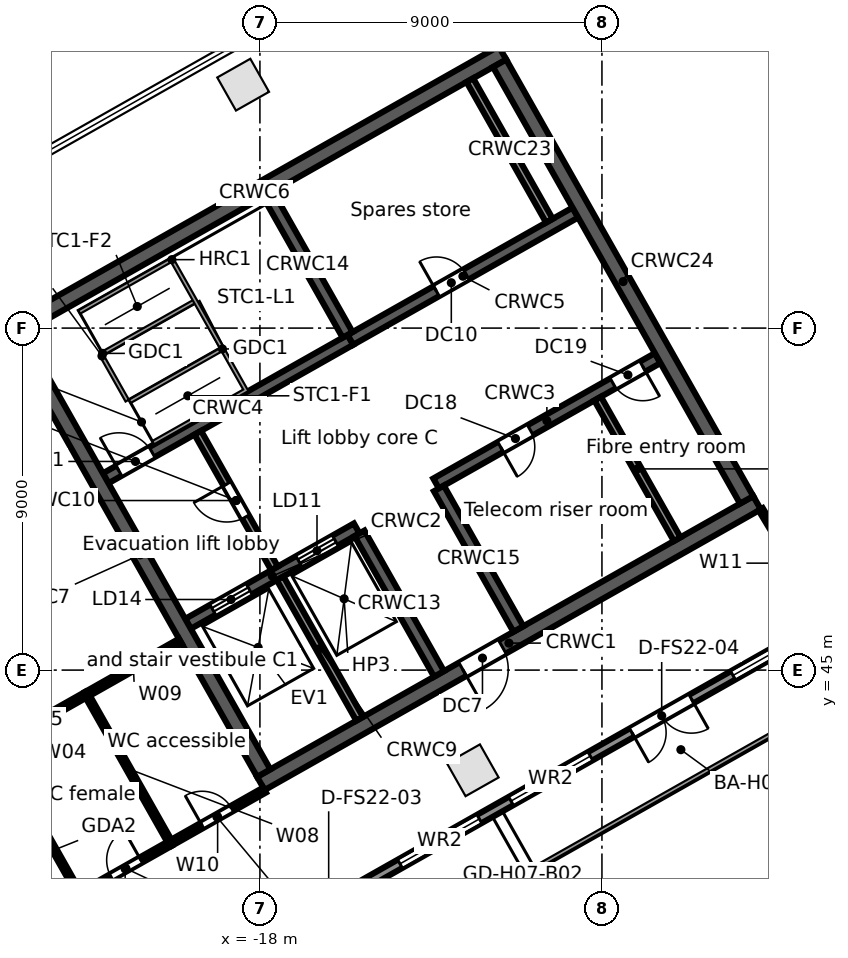
"""IFC4 building model, lengths in metres.
Left out: names, types, materials, properties, quantities, classifications, styles, units other than length and angle.
Written with IfcOpenShell. Run it as: python <this file> out.ifc"""

import sys

from ifc_helpers import new_model, si_unit, direction, frame, frame_2d, origin, origin_2d, place, context, subcontext, project, spatial, rectangle, extrude, element, fill, save


model = new_model("IFC4")
c1 = context("Model", 3, precision=1e-05, world=origin(), true_north=direction((0.0, 1.0)))
c2 = subcontext(c1, "Body", "Model", "MODEL_VIEW")
j1 = project(units=[si_unit("LENGTHUNIT", "METRE"), si_unit("PLANEANGLEUNIT", "RADIAN")], contexts=[c1])
p1 = place(None, origin())
s1 = spatial("IfcSite", under=j1, at=p1, CompositionType="ELEMENT")
p2 = place(p1, origin())
s2 = spatial("IfcBuilding", under=s1, at=p2, CompositionType="ELEMENT")
p3 = place(p2, frame((0.0, 0.0, 327.9)))
s3 = spatial("IfcBuildingStorey", under=s2, at=p3, CompositionType="ELEMENT", Elevation=327.9)
for number, where, z_axis, x_axis in (
    (1, (-18.441, 60.406, 0.0), (0.0, 0.0, 1.0), (-0.87, -0.492, 0.0)),
    (2, (-12.4, 42.363, 0.0), (0.0, 0.0, 1.0), (0.87, 0.492, 0.0)),
):
    element("IfcColumn", number, at=place(p3, frame(where, z_axis=z_axis, x_axis=x_axis)), inside=s3, PredefinedType="COLUMN", context=c2, shape_type="SweptSolid", body=[
        extrude(rectangle(XDim=1.0, YDim=1.0, at=origin_2d()), origin(), (0.0, 0.0, 1.0), 3.8),
    ])
p4 = place(p3, frame((-3.017, 46.293, 0.0), z_axis=(0.0, 0.0, 1.0), x_axis=(-0.870355474887, -0.492423950812, 0.0)))
e3 = element("IfcWall", 3, at=p4, inside=s3, PredefinedType="STANDARD", context=c2, shape_type="SweptSolid", body=[
    extrude(rectangle(XDim=40.34, YDim=0.25, at=frame_2d((20.17, 0.0))), origin(), (0.0, 0.0, 1.0), 3.52),
])
p5 = place(p4, frame((37.428, 0.0, 0.8)))
e4 = element("IfcOpeningElement", 4, at=p5, cuts=e3, PredefinedType="OPENING", context=c2, shape_type="SweptSolid", body=[
    extrude(rectangle(XDim=2.4, YDim=2.2, at=frame_2d((1.2, 1.1))), frame((0.0, 0.135, 0.0), z_axis=(0.0, -1.0, 0.0), x_axis=(1.0, 0.0, 0.0)), (0.0, 0.0, 1.0), 0.27),
])
p6 = place(p4, frame((34.372, 0.0, 0.0)))
e5 = element("IfcOpeningElement", 5, at=p6, cuts=e3, PredefinedType="OPENING", context=c2, shape_type="SweptSolid", body=[
    extrude(rectangle(XDim=1.8, YDim=2.4, at=frame_2d((0.9, 1.2))), frame((0.0, 0.135, 0.0), z_axis=(0.0, -1.0, 0.0), x_axis=(1.0, 0.0, 0.0)), (0.0, 0.0, 1.0), 0.27),
])
p7 = place(p4, frame((30.716, 0.0, 0.8)))
e6 = element("IfcOpeningElement", 6, at=p7, cuts=e3, PredefinedType="OPENING", context=c2, shape_type="SweptSolid", body=[
    extrude(rectangle(XDim=2.4, YDim=2.2, at=frame_2d((1.2, 1.1))), frame((0.0, 0.135, 0.0), z_axis=(0.0, -1.0, 0.0), x_axis=(1.0, 0.0, 0.0)), (0.0, 0.0, 1.0), 0.27),
])
p8 = place(p4, frame((27.36, 0.0, 0.8)))
e7 = element("IfcOpeningElement", 7, at=p8, cuts=e3, PredefinedType="OPENING", context=c2, shape_type="SweptSolid", body=[
    extrude(rectangle(XDim=2.4, YDim=2.2, at=frame_2d((1.2, 1.1))), frame((0.0, 0.135, 0.0), z_axis=(0.0, -1.0, 0.0), x_axis=(1.0, 0.0, 0.0)), (0.0, 0.0, 1.0), 0.27),
])
p9 = place(p4, frame((24.304, 0.0, 0.0)))
e8 = element("IfcOpeningElement", 8, at=p9, cuts=e3, PredefinedType="OPENING", context=c2, shape_type="SweptSolid", body=[
    extrude(rectangle(XDim=1.8, YDim=2.4, at=frame_2d((0.9, 1.2))), frame((0.0, 0.135, 0.0), z_axis=(0.0, -1.0, 0.0), x_axis=(1.0, 0.0, 0.0)), (0.0, 0.0, 1.0), 0.27),
])
p10 = place(p4, frame((20.648, 0.0, 0.8)))
e9 = element("IfcOpeningElement", 9, at=p10, cuts=e3, PredefinedType="OPENING", context=c2, shape_type="SweptSolid", body=[
    extrude(rectangle(XDim=2.4, YDim=2.2, at=frame_2d((1.2, 1.1))), frame((0.0, 0.135, 0.0), z_axis=(0.0, -1.0, 0.0), x_axis=(1.0, 0.0, 0.0)), (0.0, 0.0, 1.0), 0.27),
])
p11 = place(p4, frame((17.292, 0.0, 0.8)))
e10 = element("IfcOpeningElement", 10, at=p11, cuts=e3, PredefinedType="OPENING", context=c2, shape_type="SweptSolid", body=[
    extrude(rectangle(XDim=2.4, YDim=2.2, at=frame_2d((1.2, 1.1))), frame((0.0, 0.135, 0.0), z_axis=(0.0, -1.0, 0.0), x_axis=(1.0, 0.0, 0.0)), (0.0, 0.0, 1.0), 0.27),
])
p12 = place(p4, frame((14.236, 0.0, 0.0)))
e11 = element("IfcOpeningElement", 11, at=p12, cuts=e3, PredefinedType="OPENING", context=c2, shape_type="SweptSolid", body=[
    extrude(rectangle(XDim=1.8, YDim=2.4, at=frame_2d((0.9, 1.2))), frame((0.0, 0.135, 0.0), z_axis=(0.0, -1.0, 0.0), x_axis=(1.0, 0.0, 0.0)), (0.0, 0.0, 1.0), 0.27),
])
p13 = place(p4, frame((10.58, 0.0, 0.8)))
e12 = element("IfcOpeningElement", 12, at=p13, cuts=e3, PredefinedType="OPENING", context=c2, shape_type="SweptSolid", body=[
    extrude(rectangle(XDim=2.4, YDim=2.2, at=frame_2d((1.2, 1.1))), frame((0.0, 0.135, 0.0), z_axis=(0.0, -1.0, 0.0), x_axis=(1.0, 0.0, 0.0)), (0.0, 0.0, 1.0), 0.27),
])
p14 = place(p4, frame((7.224, 0.0, 0.8)))
e13 = element("IfcOpeningElement", 13, at=p14, cuts=e3, PredefinedType="OPENING", context=c2, shape_type="SweptSolid", body=[
    extrude(rectangle(XDim=2.4, YDim=2.2, at=frame_2d((1.2, 1.1))), frame((0.0, 0.135, 0.0), z_axis=(0.0, -1.0, 0.0), x_axis=(1.0, 0.0, 0.0)), (0.0, 0.0, 1.0), 0.27),
])
p15 = place(p4, frame((4.168, 0.0, 0.0)))
e14 = element("IfcOpeningElement", 14, at=p15, cuts=e3, PredefinedType="OPENING", context=c2, shape_type="SweptSolid", body=[
    extrude(rectangle(XDim=1.8, YDim=2.4, at=frame_2d((0.9, 1.2))), frame((0.0, 0.135, 0.0), z_axis=(0.0, -1.0, 0.0), x_axis=(1.0, 0.0, 0.0)), (0.0, 0.0, 1.0), 0.27),
])
p16 = place(p4, frame((0.512, 0.0, 0.8)))
e15 = element("IfcOpeningElement", 15, at=p16, cuts=e3, PredefinedType="OPENING", context=c2, shape_type="SweptSolid", body=[
    extrude(rectangle(XDim=2.4, YDim=2.2, at=frame_2d((1.2, 1.1))), frame((0.0, 0.135, 0.0), z_axis=(0.0, -1.0, 0.0), x_axis=(1.0, 0.0, 0.0)), (0.0, 0.0, 1.0), 0.27),
])
p17 = place(p3, frame((-17.975, 42.017, 0.0), z_axis=(0.0, 0.0, 1.0), x_axis=(0.87034965173, 0.492434243055, 0.0)))
e16 = element("IfcWall", 16, at=p17, inside=s3, PredefinedType="SOLIDWALL", context=c2, shape_type="SweptSolid", body=[
    extrude(rectangle(XDim=15.0, YDim=0.4, at=frame_2d((7.5, 0.0))), origin(), (0.0, 0.0, 1.0), 3.52),
])
p18 = place(p17, frame((6.1, 0.0, 0.0)))
e17 = element("IfcOpeningElement", 17, at=p18, cuts=e16, PredefinedType="OPENING", context=c2, shape_type="SweptSolid", body=[
    extrude(rectangle(XDim=1.2, YDim=2.1, at=frame_2d((0.6, 1.05))), frame((0.0, 0.21, 0.0), z_axis=(0.0, -1.0, 0.0), x_axis=(1.0, 0.0, 0.0)), (0.0, 0.0, 1.0), 0.42),
])
p19 = place(p3, frame((-19.892, 46.218, 0.0), z_axis=(0.0, 0.0, 1.0), x_axis=(0.870341639186, 0.492448404505, 0.0)))
e18 = element("IfcWall", 18, at=p19, inside=s3, PredefinedType="SOLIDWALL", context=c2, shape_type="SweptSolid", body=[
    extrude(rectangle(XDim=5.1, YDim=0.3, at=frame_2d((2.55, 0.0))), origin(), (0.0, 0.0, 1.0), 3.52),
])
p20 = place(p19, frame((0.75, 0.0, 0.0)))
e19 = element("IfcOpeningElement", 19, at=p20, cuts=e18, PredefinedType="OPENING", context=c2, shape_type="SweptSolid", body=[
    extrude(rectangle(XDim=1.1, YDim=2.1, at=frame_2d((0.55, 1.05))), frame((0.0, 0.16, 0.0), z_axis=(0.0, -1.0, 0.0), x_axis=(1.0, 0.0, 0.0)), (0.0, 0.0, 1.0), 0.32),
])
p21 = place(p19, frame((3.35, 0.0, 0.0)))
e20 = element("IfcOpeningElement", 20, at=p21, cuts=e18, PredefinedType="OPENING", context=c2, shape_type="SweptSolid", body=[
    extrude(rectangle(XDim=1.1, YDim=2.1, at=frame_2d((0.55, 1.05))), frame((0.0, 0.16, 0.0), z_axis=(0.0, -1.0, 0.0), x_axis=(1.0, 0.0, 0.0)), (0.0, 0.0, 1.0), 0.32),
])
p22 = place(p3, frame((-13.365, 49.911, 0.0), z_axis=(0.0, 0.0, 1.0), x_axis=(0.870347618718, 0.492437836272, 0.0)))
e21 = element("IfcWall", 21, at=p22, inside=s3, PredefinedType="SOLIDWALL", context=c2, shape_type="SweptSolid", body=[
    extrude(rectangle(XDim=6.7, YDim=0.3, at=frame_2d((3.35, 0.0))), origin(), (0.0, 0.0, 1.0), 3.52),
])
p23 = place(p22, frame((1.95, 0.0, 0.0)))
e22 = element("IfcOpeningElement", 22, at=p23, cuts=e21, PredefinedType="OPENING", context=c2, shape_type="SweptSolid", body=[
    extrude(rectangle(XDim=0.9, YDim=2.1, at=frame_2d((0.45, 1.05))), frame((0.0, 0.16, 0.0), z_axis=(0.0, -1.0, 0.0), x_axis=(1.0, 0.0, 0.0)), (0.0, 0.0, 1.0), 0.32),
])
p24 = place(p22, frame((5.35, 0.0, 0.0)))
e23 = element("IfcOpeningElement", 23, at=p24, cuts=e21, PredefinedType="OPENING", context=c2, shape_type="SweptSolid", body=[
    extrude(rectangle(XDim=0.9, YDim=2.1, at=frame_2d((0.45, 1.05))), frame((0.0, 0.16, 0.0), z_axis=(0.0, -1.0, 0.0), x_axis=(1.0, 0.0, 0.0)), (0.0, 0.0, 1.0), 0.32),
])
p25 = place(p3, frame((-22.059, 50.047, 0.0), z_axis=(0.0, 0.0, 1.0), x_axis=(0.87035077051, 0.49243226567, 0.0)))
e24 = element("IfcWall", 24, at=p25, inside=s3, PredefinedType="SOLIDWALL", context=c2, shape_type="SweptSolid", body=[
    extrude(rectangle(XDim=7.4, YDim=0.3, at=frame_2d((3.7, 0.0))), origin(), (0.0, 0.0, 1.0), 3.52),
])
p26 = place(p25, frame((0.4, 0.0, 0.0)))
e25 = element("IfcOpeningElement", 25, at=p26, cuts=e24, PredefinedType="OPENING", context=c2, shape_type="SweptSolid", body=[
    extrude(rectangle(XDim=1.0, YDim=2.1, at=frame_2d((0.5, 1.05))), frame((0.0, 0.16, 0.0), z_axis=(0.0, -1.0, 0.0), x_axis=(1.0, 0.0, 0.0)), (0.0, 0.0, 1.0), 0.32),
])
p27 = place(p3, frame((-15.618, 53.691, 0.0), z_axis=(0.0, 0.0, 1.0), x_axis=(0.870362830851, 0.492410948978, 0.0)))
e26 = element("IfcWall", 26, at=p27, inside=s3, PredefinedType="SOLIDWALL", context=c2, shape_type="SweptSolid", body=[
    extrude(rectangle(XDim=6.8, YDim=0.3, at=frame_2d((3.4, 0.0))), origin(), (0.0, 0.0, 1.0), 3.52),
])
p28 = place(p27, frame((2.6, 0.0, 0.0)))
e27 = element("IfcOpeningElement", 27, at=p28, cuts=e26, PredefinedType="OPENING", context=c2, shape_type="SweptSolid", body=[
    extrude(rectangle(XDim=0.9, YDim=2.1, at=frame_2d((0.45, 1.05))), frame((0.0, 0.16, 0.0), z_axis=(0.0, -1.0, 0.0), x_axis=(1.0, 0.0, 0.0)), (0.0, 0.0, 1.0), 0.32),
])
p29 = place(p3, frame((-24.672, 53.854, 0.0), z_axis=(0.0, 0.0, 1.0), x_axis=(0.870353598469, 0.492427267353, 0.0)))
e28 = element("IfcWall", 28, at=p29, inside=s3, PredefinedType="SOLIDWALL", context=c2, shape_type="SweptSolid", body=[
    extrude(rectangle(XDim=15.0, YDim=0.4, at=frame_2d((7.5, 0.0))), origin(), (0.0, 0.0, 1.0), 3.52),
])
p30 = place(p3, frame((-24.4, 53.779, 0.0), z_axis=(0.0, 0.0, 1.0), x_axis=(0.492421663121, -0.870356769198, 0.0)))
e29 = element("IfcWall", 29, at=p30, inside=s3, PredefinedType="SOLIDWALL", context=c2, shape_type="SweptSolid", body=[
    extrude(rectangle(XDim=13.2, YDim=0.4, at=frame_2d((6.6, 0.0))), origin(), (0.0, 0.0, 1.0), 3.52),
])
p31 = place(p3, frame((-17.469, 47.417, 0.0), z_axis=(0.0, 0.0, 1.0), x_axis=(0.492466057713, -0.870331650579, 0.0)))
e30 = element("IfcWall", 30, at=p31, inside=s3, PredefinedType="SOLIDWALL", context=c2, shape_type="SweptSolid", body=[
    extrude(rectangle(XDim=4.25, YDim=0.2, at=frame_2d((2.125, 0.0))), origin(), (0.0, 0.0, 1.0), 3.52),
])
p32 = place(p3, frame((-19.635, 51.246, 0.0), z_axis=(0.0, 0.0, 1.0), x_axis=(0.492408451753, -0.87036424366, 0.0)))
e31 = element("IfcWall", 31, at=p32, inside=s3, PredefinedType="PARTITIONING", context=c2, shape_type="SweptSolid", body=[
    extrude(rectangle(XDim=4.1, YDim=0.2, at=frame_2d((2.05, 0.0))), origin(), (0.0, 0.0, 1.0), 3.52),
])
p33 = place(p32, frame((1.55, 0.0, 0.0)))
e32 = element("IfcOpeningElement", 32, at=p33, cuts=e31, PredefinedType="OPENING", context=c2, shape_type="SweptSolid", body=[
    extrude(rectangle(XDim=1.0, YDim=2.1, at=frame_2d((0.5, 1.05))), frame((0.0, 0.11, 0.0), z_axis=(0.0, -1.0, 0.0), x_axis=(1.0, 0.0, 0.0)), (0.0, 0.0, 1.0), 0.22),
])
for number, where, z_axis, x_axis in (
    (33, (-15.379, 48.599, 0.0), (0.0, 0.0, 1.0), (0.492, -0.87, 0.0)),
    (34, (-17.785, 57.521, 0.0), (0.0, 0.0, 1.0), (0.492, -0.87, 0.0)),
):
    element("IfcWall", number, at=place(p3, frame(where, z_axis=z_axis, x_axis=x_axis)), inside=s3, PredefinedType="SOLIDWALL", context=c2, shape_type="SweptSolid", body=[
        extrude(rectangle(XDim=4.25, YDim=0.3, at=frame_2d((2.125, 0.0))), origin(), (0.0, 0.0, 1.0), 3.52),
    ])
p34 = place(p3, frame((-13.291, 49.781, 0.0), z_axis=(0.0, 0.0, 1.0), x_axis=(0.492397924348, -0.870370199454, 0.0)))
e35 = element("IfcWall", 35, at=p34, inside=s3, PredefinedType="SOLIDWALL", context=c2, shape_type="SweptSolid", body=[
    extrude(rectangle(XDim=4.25, YDim=0.3, at=frame_2d((2.125, 0.0))), origin(), (0.0, 0.0, 1.0), 3.52),
])
p35 = place(p3, frame((-9.113, 52.144, 0.0), z_axis=(0.0, 0.0, 1.0), x_axis=(0.492422543467, -0.870356271124, 0.0)))
e36 = element("IfcWall", 36, at=p35, inside=s3, PredefinedType="PARTITIONING", context=c2, shape_type="SweptSolid", body=[
    extrude(rectangle(XDim=4.25, YDim=0.2, at=frame_2d((2.125, 0.0))), origin(), (0.0, 0.0, 1.0), 3.52),
])
p36 = place(p3, frame((-12.476, 60.525, 0.0), z_axis=(0.0, 0.0, 1.0), x_axis=(0.492422543467, -0.870356271124, 0.0)))
e37 = element("IfcWall", 37, at=p36, inside=s3, PredefinedType="SOLIDWALL", context=c2, shape_type="SweptSolid", body=[
    extrude(rectangle(XDim=4.25, YDim=0.2, at=frame_2d((2.125, 0.0))), origin(), (0.0, 0.0, 1.0), 3.52),
])
p37 = place(p3, frame((-11.692, 60.968, 0.0), z_axis=(0.0, 0.0, 1.0), x_axis=(0.492421663121, -0.870356769198, 0.0)))
e38 = element("IfcWall", 38, at=p37, inside=s3, PredefinedType="SOLIDWALL", context=c2, shape_type="SweptSolid", body=[
    extrude(rectangle(XDim=13.2, YDim=0.4, at=frame_2d((6.6, 0.0))), origin(), (0.0, 0.0, 1.0), 3.52),
])
p38 = place(p3, frame((-24.959, 43.007, 0.0), z_axis=(0.0, 0.0, 1.0), x_axis=(0.492412939134, -0.87036170491, 0.0)))
e39 = element("IfcWall", 39, at=p38, inside=s3, PredefinedType="PARTITIONING", context=c2, shape_type="SweptSolid", body=[
    extrude(rectangle(XDim=4.5, YDim=0.125, at=frame_2d((2.25, 0.0))), origin(), (0.0, 0.0, 1.0), 3.52),
])
p39 = place(p3, frame((-24.959, 43.007, 0.0), z_axis=(0.0, 0.0, 1.0), x_axis=(0.870430549821, 0.492291232848, 0.0)))
e40 = element("IfcWall", 40, at=p39, inside=s3, PredefinedType="PARTITIONING", context=c2, shape_type="SweptSolid", body=[
    extrude(rectangle(XDim=2.75, YDim=0.15, at=frame_2d((1.375, 0.0))), origin(), (0.0, 0.0, 1.0), 3.52),
])
p40 = place(p3, frame((-22.743, 39.09, 0.0), z_axis=(0.0, 0.0, 1.0), x_axis=(0.870409035047, 0.492329271634, 0.0)))
e41 = element("IfcWall", 41, at=p40, inside=s3, PredefinedType="PARTITIONING", context=c2, shape_type="SweptSolid", body=[
    extrude(rectangle(XDim=2.75, YDim=0.15, at=frame_2d((1.375, 0.0))), origin(), (0.0, 0.0, 1.0), 3.52),
])
p41 = place(p40, frame((0.95, 0.0, 0.0)))
e42 = element("IfcOpeningElement", 42, at=p41, cuts=e41, PredefinedType="OPENING", context=c2, shape_type="SweptSolid", body=[
    extrude(rectangle(XDim=0.9, YDim=2.1, at=frame_2d((0.45, 1.05))), frame((0.0, 0.085, 0.0), z_axis=(0.0, -1.0, 0.0), x_axis=(1.0, 0.0, 0.0)), (0.0, 0.0, 1.0), 0.17),
])
p42 = place(p3, frame((-22.565, 44.361, 0.0), z_axis=(0.0, 0.0, 1.0), x_axis=(0.492371842706, -0.870384954207, 0.0)))
e43 = element("IfcWall", 43, at=p42, inside=s3, PredefinedType="PARTITIONING", context=c2, shape_type="SweptSolid", body=[
    extrude(rectangle(XDim=4.5, YDim=0.125, at=frame_2d((2.25, 0.0))), origin(), (0.0, 0.0, 1.0), 3.52),
])
p43 = place(p3, frame((-22.565, 44.361, 0.0), z_axis=(0.0, 0.0, 1.0), x_axis=(0.87029856663, 0.492524522152, 0.0)))
e44 = element("IfcWall", 44, at=p43, inside=s3, PredefinedType="PARTITIONING", context=c2, shape_type="SweptSolid", body=[
    extrude(rectangle(XDim=2.84, YDim=0.15, at=frame_2d((1.42, 0.0))), origin(), (0.0, 0.0, 1.0), 3.52),
])
p44 = place(p3, frame((-20.349, 40.444, 0.0), z_axis=(0.0, 0.0, 1.0), x_axis=(0.87031941539, 0.492487680247, 0.0)))
e45 = element("IfcWall", 45, at=p44, inside=s3, PredefinedType="PARTITIONING", context=c2, shape_type="SweptSolid", body=[
    extrude(rectangle(XDim=2.841, YDim=0.15, at=frame_2d((1.42, 0.0))), origin(), (0.0, 0.0, 1.0), 3.52),
])
p45 = place(p44, frame((0.95, 0.0, 0.0)))
e46 = element("IfcOpeningElement", 46, at=p45, cuts=e45, PredefinedType="OPENING", context=c2, shape_type="SweptSolid", body=[
    extrude(rectangle(XDim=0.9, YDim=2.1, at=frame_2d((0.45, 1.05))), frame((0.0, 0.085, 0.0), z_axis=(0.0, -1.0, 0.0), x_axis=(1.0, 0.0, 0.0)), (0.0, 0.0, 1.0), 0.17),
])
p46 = place(p3, frame((-4.821, 49.23, 0.0), z_axis=(0.0, 0.0, 1.0), x_axis=(0.515006587647, -0.857186219371, 0.0)))
e47 = element("IfcWall", 47, at=p46, inside=s3, PredefinedType="PARTITIONING", context=c2, shape_type="SweptSolid", body=[
    extrude(rectangle(XDim=3.303, YDim=0.125, at=frame_2d((1.651, 0.0))), origin(), (0.0, 0.0, 1.0), 2.8),
])
p47 = place(p46, frame((1.2, 0.0, 0.0)))
e48 = element("IfcOpeningElement", 48, at=p47, cuts=e47, PredefinedType="OPENING", context=c2, shape_type="SweptSolid", body=[
    extrude(rectangle(XDim=1.8, YDim=2.1, at=frame_2d((0.9, 1.05))), frame((0.0, 0.073, 0.0), z_axis=(0.0, -1.0, 0.0), x_axis=(1.0, 0.0, 0.0)), (0.0, 0.0, 1.0), 0.145),
])
p48 = place(p13, origin())
e49 = element("IfcWindow", 49, at=p48, inside=s3, PartitioningType="SINGLE_PANEL", PredefinedType="WINDOW", context=c2, shape_type="SweptSolid", body=[
    extrude(rectangle(XDim=2.4, YDim=2.2, at=frame_2d((1.2, 1.1))), frame((0.0, 0.03, 0.0), z_axis=(0.0, -1.0, 0.0), x_axis=(1.0, 0.0, 0.0)), (0.0, 0.0, 1.0), 0.06),
])
fill(e12, e49)
p49 = place(p14, origin())
e50 = element("IfcWindow", 50, at=p49, inside=s3, PartitioningType="SINGLE_PANEL", PredefinedType="WINDOW", context=c2, shape_type="SweptSolid", body=[
    extrude(rectangle(XDim=2.4, YDim=2.2, at=frame_2d((1.2, 1.1))), frame((0.0, 0.03, 0.0), z_axis=(0.0, -1.0, 0.0), x_axis=(1.0, 0.0, 0.0)), (0.0, 0.0, 1.0), 0.06),
])
fill(e13, e50)
p50 = place(p15, origin())
e51 = element("IfcDoor", 51, at=p50, inside=s3, OperationType="DOUBLE_DOOR_SINGLE_SWING", PredefinedType="DOOR", context=c2, shape_type="SweptSolid", body=[
    extrude(rectangle(XDim=1.8, YDim=2.4, at=frame_2d((0.9, 1.2))), frame((0.0, 0.025, 0.0), z_axis=(0.0, -1.0, 0.0), x_axis=(1.0, 0.0, 0.0)), (0.0, 0.0, 1.0), 0.05),
])
fill(e14, e51)
p51 = place(p16, origin())
e52 = element("IfcWindow", 52, at=p51, inside=s3, PartitioningType="SINGLE_PANEL", PredefinedType="WINDOW", context=c2, shape_type="SweptSolid", body=[
    extrude(rectangle(XDim=2.4, YDim=2.2, at=frame_2d((1.2, 1.1))), frame((0.0, 0.03, 0.0), z_axis=(0.0, -1.0, 0.0), x_axis=(1.0, 0.0, 0.0)), (0.0, 0.0, 1.0), 0.06),
])
fill(e15, e52)
p52 = place(p20, origin())
e53 = element("IfcDoor", 53, at=p52, inside=s3, OperationType="DOUBLE_DOOR_SLIDING", PredefinedType="DOOR", context=c2, shape_type="SweptSolid", body=[
    extrude(rectangle(XDim=1.1, YDim=2.1, at=frame_2d((0.55, 1.05))), frame((0.0, 0.025, 0.0), z_axis=(0.0, -1.0, 0.0), x_axis=(1.0, 0.0, 0.0)), (0.0, 0.0, 1.0), 0.05),
])
fill(e19, e53)
p53 = place(p21, origin())
e54 = element("IfcDoor", 54, at=p53, inside=s3, OperationType="DOUBLE_DOOR_SLIDING", PredefinedType="DOOR", context=c2, shape_type="SweptSolid", body=[
    extrude(rectangle(XDim=1.1, YDim=2.1, at=frame_2d((0.55, 1.05))), frame((0.0, 0.025, 0.0), z_axis=(0.0, -1.0, 0.0), x_axis=(1.0, 0.0, 0.0)), (0.0, 0.0, 1.0), 0.05),
])
fill(e20, e54)
p54 = place(p26, origin())
e55 = element("IfcDoor", 55, at=p54, inside=s3, OperationType="SINGLE_SWING_LEFT", PredefinedType="DOOR", context=c2, shape_type="SweptSolid", body=[
    extrude(rectangle(XDim=1.0, YDim=2.1, at=frame_2d((0.5, 1.05))), frame((0.0, 0.025, 0.0), z_axis=(0.0, -1.0, 0.0), x_axis=(1.0, 0.0, 0.0)), (0.0, 0.0, 1.0), 0.05),
])
fill(e25, e55)
p55 = place(p33, frame((1.0, 0.0, 0.0), z_axis=(0.0, 0.0, 1.0), x_axis=(-1.0, 0.0, 0.0)))
e56 = element("IfcDoor", 56, at=p55, inside=s3, OperationType="SINGLE_SWING_RIGHT", PredefinedType="DOOR", context=c2, shape_type="SweptSolid", body=[
    extrude(rectangle(XDim=1.0, YDim=2.1, at=frame_2d((0.5, 1.05))), frame((0.0, 0.025, 0.0), z_axis=(0.0, -1.0, 0.0), x_axis=(1.0, 0.0, 0.0)), (0.0, 0.0, 1.0), 0.05),
])
fill(e32, e56)
p56 = place(p18, frame((1.2, 0.0, 0.0), z_axis=(0.0, 0.0, 1.0), x_axis=(-1.0, 0.0, 0.0)))
e57 = element("IfcDoor", 57, at=p56, inside=s3, OperationType="SINGLE_SWING_RIGHT", PredefinedType="DOOR", context=c2, shape_type="SweptSolid", body=[
    extrude(rectangle(XDim=1.2, YDim=2.1, at=frame_2d((0.6, 1.05))), frame((0.0, 0.025, 0.0), z_axis=(0.0, -1.0, 0.0), x_axis=(1.0, 0.0, 0.0)), (0.0, 0.0, 1.0), 0.05),
])
fill(e17, e57)
p57 = place(p28, origin())
e58 = element("IfcDoor", 58, at=p57, inside=s3, OperationType="SINGLE_SWING_LEFT", PredefinedType="DOOR", context=c2, shape_type="SweptSolid", body=[
    extrude(rectangle(XDim=0.9, YDim=2.1, at=frame_2d((0.45, 1.05))), frame((0.0, 0.025, 0.0), z_axis=(0.0, -1.0, 0.0), x_axis=(1.0, 0.0, 0.0)), (0.0, 0.0, 1.0), 0.05),
])
fill(e27, e58)
p58 = place(p23, frame((0.9, 0.0, 0.0), z_axis=(0.0, 0.0, 1.0), x_axis=(-1.0, 0.0, 0.0)))
e59 = element("IfcDoor", 59, at=p58, inside=s3, OperationType="SINGLE_SWING_RIGHT", PredefinedType="DOOR", context=c2, shape_type="SweptSolid", body=[
    extrude(rectangle(XDim=0.9, YDim=2.1, at=frame_2d((0.45, 1.05))), frame((0.0, 0.025, 0.0), z_axis=(0.0, -1.0, 0.0), x_axis=(1.0, 0.0, 0.0)), (0.0, 0.0, 1.0), 0.05),
])
fill(e22, e59)
p59 = place(p24, frame((0.9, 0.0, 0.0), z_axis=(0.0, 0.0, 1.0), x_axis=(-1.0, 0.0, 0.0)))
e60 = element("IfcDoor", 60, at=p59, inside=s3, OperationType="SINGLE_SWING_LEFT", PredefinedType="DOOR", context=c2, shape_type="SweptSolid", body=[
    extrude(rectangle(XDim=0.9, YDim=2.1, at=frame_2d((0.45, 1.05))), frame((0.0, 0.025, 0.0), z_axis=(0.0, -1.0, 0.0), x_axis=(1.0, 0.0, 0.0)), (0.0, 0.0, 1.0), 0.05),
])
fill(e23, e60)
p60 = place(p41, origin())
e61 = element("IfcDoor", 61, at=p60, inside=s3, OperationType="SINGLE_SWING_RIGHT", PredefinedType="DOOR", context=c2, shape_type="SweptSolid", body=[
    extrude(rectangle(XDim=0.9, YDim=2.1, at=frame_2d((0.45, 1.05))), frame((0.0, 0.025, 0.0), z_axis=(0.0, -1.0, 0.0), x_axis=(1.0, 0.0, 0.0)), (0.0, 0.0, 1.0), 0.05),
])
fill(e42, e61)
p61 = place(p45, origin())
e62 = element("IfcDoor", 62, at=p61, inside=s3, OperationType="SINGLE_SWING_LEFT", PredefinedType="DOOR", context=c2, shape_type="SweptSolid", body=[
    extrude(rectangle(XDim=0.9, YDim=2.1, at=frame_2d((0.45, 1.05))), frame((0.0, 0.025, 0.0), z_axis=(0.0, -1.0, 0.0), x_axis=(1.0, 0.0, 0.0)), (0.0, 0.0, 1.0), 0.05),
])
fill(e46, e62)
save(model, sys.argv[1])
